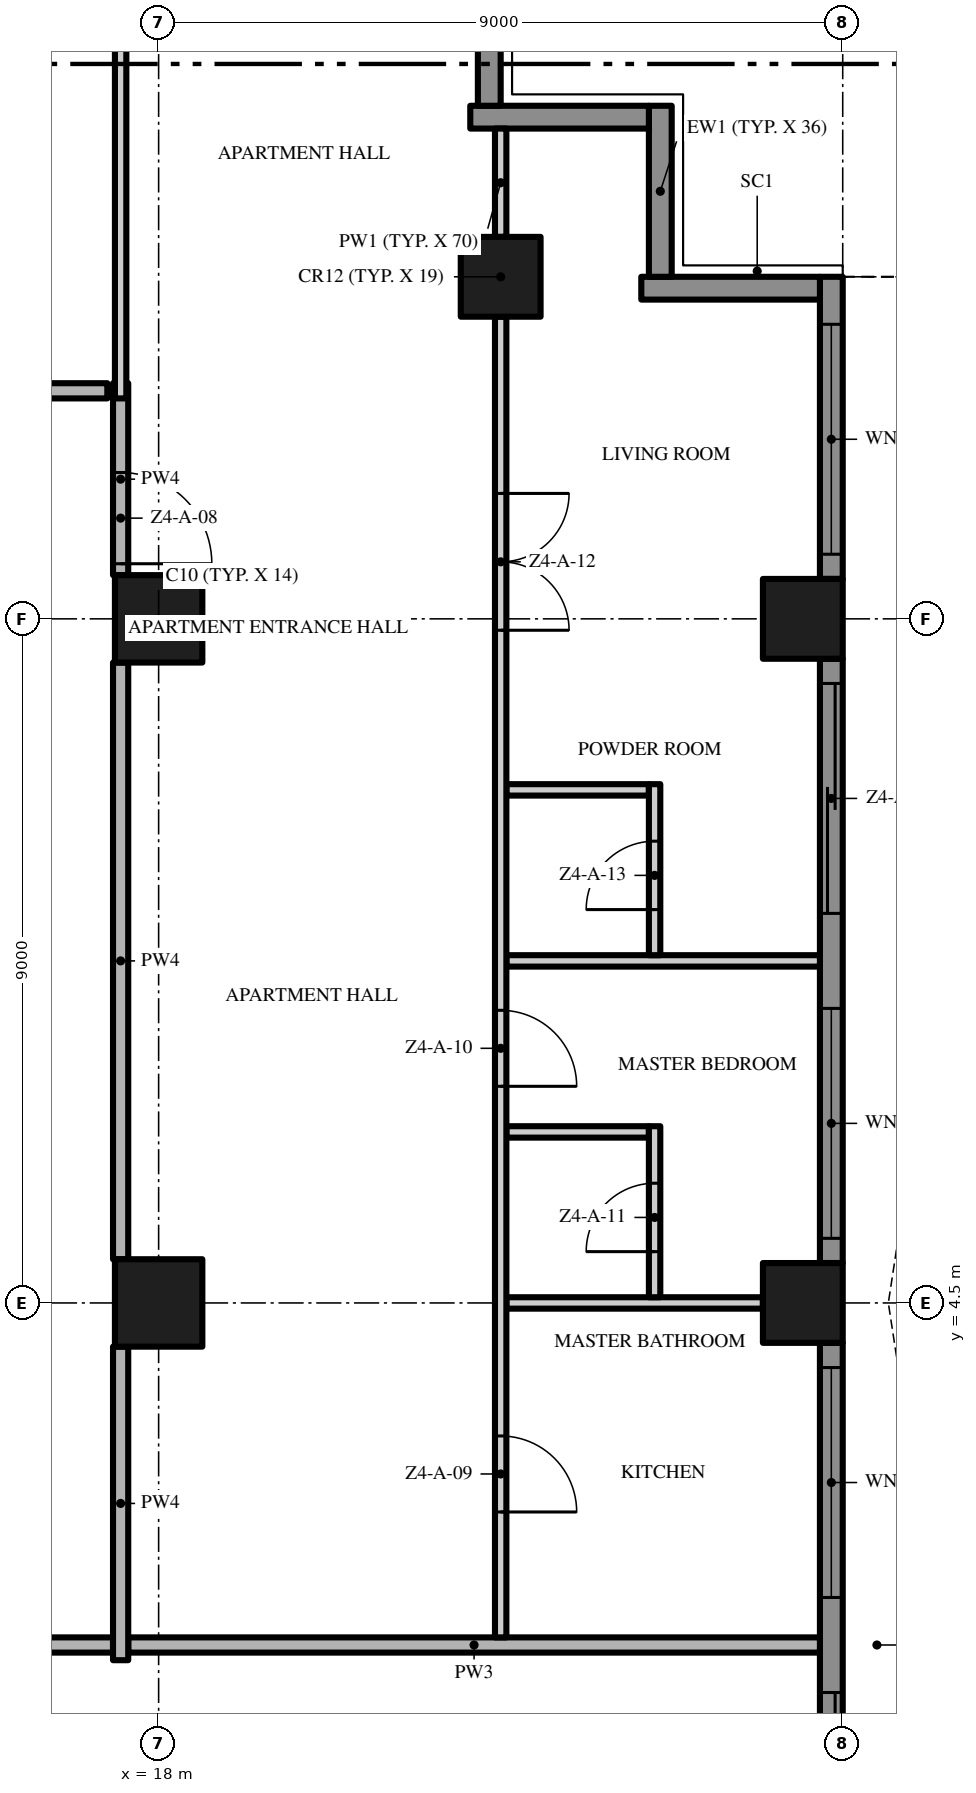
"""IFC4 building model, lengths in metres.
Left out: names, types, materials, properties, quantities, classifications, styles, units other than length and angle.
Written with IfcOpenShell. Run it as: python <this file> out.ifc"""

import sys

from ifc_helpers import new_model, si_unit, direction, frame, frame_2d, origin, origin_2d, place, context, subcontext, project, spatial, polyline, rectangle, outline, extrude, element, fill, save


model = new_model("IFC4")
c1 = context("Model", 3, precision=1e-05, world=origin(), true_north=direction((0.0, 1.0)))
c2 = subcontext(c1, "Body", "Model", "MODEL_VIEW")
j1 = project(units=[si_unit("LENGTHUNIT", "METRE"), si_unit("PLANEANGLEUNIT", "RADIAN")], contexts=[c1])
p1 = place(None, origin())
s1 = spatial("IfcSite", under=j1, at=p1, CompositionType="ELEMENT")
p2 = place(p1, origin())
s2 = spatial("IfcBuilding", under=s1, at=p2, CompositionType="ELEMENT")
p3 = place(p2, frame((0.0, 0.0, 188.2)))
s3 = spatial("IfcBuildingStorey", under=s2, at=p3, CompositionType="ELEMENT", Elevation=188.2)
for number, where, z_axis, x_axis in (
    (1, (18.0, 13.5, 0.0), (0.0, 0.0, 1.0), (1.0, 0.0, 0.0)),
    (2, (18.0, 4.5, 0.0), (0.0, 0.0, 1.0), (1.0, 0.0, 0.0)),
):
    element("IfcColumn", number, at=place(p3, frame(where, z_axis=z_axis, x_axis=x_axis)), inside=s3, PredefinedType="COLUMN", context=c2, shape_type="SweptSolid", body=[
        extrude(rectangle(XDim=1.15, YDim=1.15, at=origin_2d()), origin(), (0.0, 0.0, 1.0), 3.5),
    ])
for number, where, z_axis, x_axis in (
    (3, (26.475, 13.5, 0.0), (0.0, 0.0, 1.0), (1.0, 0.0, 0.0)),
    (4, (22.5, 18.0, 0.0), (0.0, 0.0, 1.0), (1.0, 0.0, 0.0)),
    (5, (26.475, 4.5, 0.0), (0.0, 0.0, 1.0), (1.0, 0.0, 0.0)),
):
    element("IfcColumn", number, at=place(p3, frame(where, z_axis=z_axis, x_axis=x_axis)), inside=s3, PredefinedType="COLUMN", context=c2, shape_type="SweptSolid", body=[
        extrude(rectangle(XDim=1.05, YDim=1.05, at=origin_2d()), origin(), (0.0, 0.0, 1.0), 3.5),
    ])
p4 = place(p3, frame((26.85, 3.975, 0.0), z_axis=(0.0, 0.0, 1.0), x_axis=(0.0, -1.0, 0.0)))
e6 = element("IfcWall", 6, at=p4, inside=s3, PredefinedType="SOLIDWALL", context=c2, shape_type="SweptSolid", body=[
    extrude(rectangle(XDim=7.95, YDim=0.3, at=frame_2d((3.975, 0.0))), origin(), (0.0, 0.0, 1.0), 3.5),
])
p5 = place(p4, frame((4.6, 0.0, 0.0)))
e7 = element("IfcOpeningElement", 7, at=p5, cuts=e6, PredefinedType="OPENING", context=c2, shape_type="SweptSolid", body=[
    extrude(rectangle(XDim=3.025, YDim=2.4, at=frame_2d((1.512, 1.2))), frame((0.0, 0.16, 0.0), z_axis=(0.0, -1.0, 0.0), x_axis=(1.0, 0.0, 0.0)), (0.0, 0.0, 1.0), 0.32),
])
p6 = place(p4, frame((0.325, 0.0, 0.45)))
e8 = element("IfcOpeningElement", 8, at=p6, cuts=e6, PredefinedType="OPENING", context=c2, shape_type="SweptSolid", body=[
    extrude(rectangle(XDim=3.025, YDim=2.65, at=frame_2d((1.512, 1.325))), frame((0.0, 0.16, 0.0), z_axis=(0.0, -1.0, 0.0), x_axis=(1.0, 0.0, 0.0)), (0.0, 0.0, 1.0), 0.32),
])
p7 = place(p3, frame((26.85, 12.975, 0.0), z_axis=(0.0, 0.0, 1.0), x_axis=(0.0, -1.0, 0.0)))
e9 = element("IfcWall", 9, at=p7, inside=s3, PredefinedType="SOLIDWALL", context=c2, shape_type="SweptSolid", body=[
    extrude(rectangle(XDim=7.95, YDim=0.3, at=frame_2d((3.975, 0.0))), origin(), (0.0, 0.0, 1.0), 3.5),
])
p8 = place(p7, frame((4.6, 0.0, 0.45)))
e10 = element("IfcOpeningElement", 10, at=p8, cuts=e9, PredefinedType="OPENING", context=c2, shape_type="SweptSolid", body=[
    extrude(rectangle(XDim=3.025, YDim=2.65, at=frame_2d((1.512, 1.325))), frame((0.0, 0.16, 0.0), z_axis=(0.0, -1.0, 0.0), x_axis=(1.0, 0.0, 0.0)), (0.0, 0.0, 1.0), 0.32),
])
p9 = place(p7, frame((0.325, 0.0, 0.0)))
e11 = element("IfcOpeningElement", 11, at=p9, cuts=e9, PredefinedType="OPENING", context=c2, shape_type="SweptSolid", body=[
    extrude(rectangle(XDim=3.025, YDim=2.4, at=frame_2d((1.512, 1.2))), frame((0.0, 0.16, 0.0), z_axis=(0.0, -1.0, 0.0), x_axis=(1.0, 0.0, 0.0)), (0.0, 0.0, 1.0), 0.32),
])
p10 = place(p3, frame((26.85, 18.0, 0.0), z_axis=(0.0, 0.0, 1.0), x_axis=(0.0, -1.0, 0.0)))
e12 = element("IfcWall", 12, at=p10, inside=s3, PredefinedType="SOLIDWALL", context=c2, shape_type="SweptSolid", body=[
    extrude(rectangle(XDim=3.975, YDim=0.3, at=frame_2d((1.988, 0.0))), origin(), (0.0, 0.0, 1.0), 3.5),
])
p11 = place(p10, frame((0.625, 0.0, 0.45)))
e13 = element("IfcOpeningElement", 13, at=p11, cuts=e12, PredefinedType="OPENING", context=c2, shape_type="SweptSolid", body=[
    extrude(rectangle(XDim=3.025, YDim=2.65, at=frame_2d((1.512, 1.325))), frame((0.0, 0.16, 0.0), z_axis=(0.0, -1.0, 0.0), x_axis=(1.0, 0.0, 0.0)), (0.0, 0.0, 1.0), 0.32),
])
p12 = place(p3, frame((24.35, 17.85, 0.0), z_axis=(0.0, 0.0, 1.0), x_axis=(1.0, 0.0, 0.0)))
e14 = element("IfcWall", 14, at=p12, inside=s3, PredefinedType="SOLIDWALL", context=c2, shape_type="SweptSolid", body=[
    extrude(rectangle(XDim=2.35, YDim=0.3, at=frame_2d((1.175, 0.0))), origin(), (0.0, 0.0, 1.0), 3.5),
])
p13 = place(p3, frame((24.6, 20.25, 0.0), z_axis=(0.0, 0.0, 1.0), x_axis=(0.0, -1.0, 0.0)))
e15 = element("IfcWall", 15, at=p13, inside=s3, PredefinedType="SOLIDWALL", context=c2, shape_type="SweptSolid", body=[
    extrude(rectangle(XDim=2.25, YDim=0.3, at=frame_2d((1.125, 0.0))), origin(), (0.0, 0.0, 1.0), 3.5),
])
p14 = place(p3, frame((22.1, 20.1, 0.0), z_axis=(0.0, 0.0, 1.0), x_axis=(1.0, 0.0, 0.0)))
e16 = element("IfcWall", 16, at=p14, inside=s3, PredefinedType="SOLIDWALL", context=c2, shape_type="SweptSolid", body=[
    extrude(rectangle(XDim=2.35, YDim=0.3, at=frame_2d((1.175, 0.0))), origin(), (0.0, 0.0, 1.0), 3.5),
])
p15 = place(p3, frame((22.35, 22.5, 0.0), z_axis=(0.0, 0.0, 1.0), x_axis=(0.0, -1.0, 0.0)))
e17 = element("IfcWall", 17, at=p15, inside=s3, PredefinedType="SOLIDWALL", context=c2, shape_type="SweptSolid", body=[
    extrude(rectangle(XDim=2.25, YDim=0.3, at=frame_2d((1.125, 0.0))), origin(), (0.0, 0.0, 1.0), 3.5),
])
p16 = place(p3, origin())
e18 = element("IfcWall", 18, at=p16, inside=s3, PredefinedType="USERDEFINED", context=c2, shape_type="SweptSolid", body=[
    extrude(outline(polyline([(30.0, -18.0), (29.771, -16.5), (29.171, -15.0), (28.429, -13.5), (27.829, -12.0), (27.6, -10.5), (27.829, -9.0), (28.429, -7.5), (29.171, -6.0), (29.771, -4.5), (30.0, -3.0), (29.771, -1.5), (29.171, 0.0), (28.429, 1.5), (27.829, 3.0), (27.6, 4.5), (27.829, 6.0), (28.429, 7.5), (29.171, 9.0), (29.771, 10.5), (30.0, 12.0), (29.771, 13.5), (29.171, 15.0), (28.429, 16.5), (27.829, 18.0), (27.597, 17.907), (28.201, 16.398), (28.942, 14.898), (29.528, 13.434), (29.747, 12.0), (29.528, 10.566), (28.942, 9.102), (28.201, 7.602), (27.586, 6.066), (27.347, 4.5), (27.586, 2.934), (28.201, 1.398), (28.942, -0.102), (29.528, -1.566), (29.747, -3.0), (29.528, -4.434), (28.942, -5.898), (28.201, -7.398), (27.586, -8.934), (27.347, -10.5), (27.586, -12.066), (28.201, -13.602), (28.942, -15.102), (29.528, -16.566), (29.753, -18.038), (30.0, -18.0)])), origin(), (0.0, 0.0, 1.0), 0.9),
])
p17 = place(p3, frame((17.4, 0.0, 0.0), z_axis=(0.0, 0.0, 1.0), x_axis=(-1.0, 0.0, 0.0)))
e19 = element("IfcWall", 19, at=p17, inside=s3, PredefinedType="PARTITIONING", context=c2, shape_type="SweptSolid", body=[
    extrude(rectangle(XDim=17.3, YDim=0.2, at=frame_2d((8.65, 0.0))), origin(), (0.0, 0.0, 1.0), 3.5),
])
p18 = place(p17, frame((7.65, 0.0, 0.0)))
e20 = element("IfcOpeningElement", 20, at=p18, cuts=e19, PredefinedType="OPENING", context=c2, shape_type="SweptSolid", body=[
    extrude(rectangle(XDim=1.5, YDim=2.4, at=frame_2d((0.75, 1.2))), frame((0.0, 0.11, 0.0), z_axis=(0.0, -1.0, 0.0), x_axis=(1.0, 0.0, 0.0)), (0.0, 0.0, 1.0), 0.22),
])
p19 = place(p3, frame((17.6, 0.0, 0.0), z_axis=(0.0, 0.0, 1.0), x_axis=(1.0, 0.0, 0.0)))
e21 = element("IfcWall", 21, at=p19, inside=s3, PredefinedType="PARTITIONING", context=c2, shape_type="SweptSolid", body=[
    extrude(rectangle(XDim=9.1, YDim=0.2, at=frame_2d((4.55, 0.0))), origin(), (0.0, 0.0, 1.0), 3.5),
])
p20 = place(p3, frame((22.575, 4.5, 0.0), z_axis=(0.0, 0.0, 1.0), x_axis=(1.0, 0.0, 0.0)))
e22 = element("IfcWall", 22, at=p20, inside=s3, PredefinedType="PARTITIONING", context=c2, shape_type="SweptSolid", body=[
    extrude(rectangle(XDim=3.375, YDim=0.15, at=frame_2d((1.688, 0.0))), origin(), (0.0, 0.0, 1.0), 3.5),
])
p21 = place(p3, frame((22.575, 6.75, 0.0), z_axis=(0.0, 0.0, 1.0), x_axis=(1.0, 0.0, 0.0)))
e23 = element("IfcWall", 23, at=p21, inside=s3, PredefinedType="PARTITIONING", context=c2, shape_type="SweptSolid", body=[
    extrude(rectangle(XDim=1.875, YDim=0.15, at=frame_2d((0.938, 0.0))), origin(), (0.0, 0.0, 1.0), 3.5),
])
p22 = place(p3, frame((22.575, 9.0, 0.0), z_axis=(0.0, 0.0, 1.0), x_axis=(1.0, 0.0, 0.0)))
e24 = element("IfcWall", 24, at=p22, inside=s3, PredefinedType="PARTITIONING", context=c2, shape_type="SweptSolid", body=[
    extrude(rectangle(XDim=4.125, YDim=0.15, at=frame_2d((2.062, 0.0))), origin(), (0.0, 0.0, 1.0), 3.5),
])
p23 = place(p3, frame((22.575, 11.25, 0.0), z_axis=(0.0, 0.0, 1.0), x_axis=(1.0, 0.0, 0.0)))
e25 = element("IfcWall", 25, at=p23, inside=s3, PredefinedType="PARTITIONING", context=c2, shape_type="SweptSolid", body=[
    extrude(rectangle(XDim=1.875, YDim=0.15, at=frame_2d((0.938, 0.0))), origin(), (0.0, 0.0, 1.0), 3.5),
])
p24 = place(p3, frame((13.5, 16.5, 0.0), z_axis=(0.0, 0.0, 1.0), x_axis=(1.0, 0.0, 0.0)))
e26 = element("IfcWall", 26, at=p24, inside=s3, PredefinedType="PARTITIONING", context=c2, shape_type="SweptSolid", body=[
    extrude(rectangle(XDim=3.825, YDim=0.2, at=frame_2d((1.913, 0.0))), origin(), (0.0, 0.0, 1.0), 3.5),
])
p25 = place(p24, frame((1.55, 0.0, 0.0)))
e27 = element("IfcOpeningElement", 27, at=p25, cuts=e26, PredefinedType="OPENING", context=c2, shape_type="SweptSolid", body=[
    extrude(rectangle(XDim=0.9, YDim=2.1, at=frame_2d((0.45, 1.05))), frame((0.0, 0.11, 0.0), z_axis=(0.0, -1.0, 0.0), x_axis=(1.0, 0.0, 0.0)), (0.0, 0.0, 1.0), 0.22),
])
p26 = place(p3, frame((17.5, -0.2, 0.0), z_axis=(0.0, 0.0, 1.0), x_axis=(0.0, 1.0, 0.0)))
e28 = element("IfcWall", 28, at=p26, inside=s3, PredefinedType="PARTITIONING", context=c2, shape_type="SweptSolid", body=[
    extrude(rectangle(XDim=4.125, YDim=0.2, at=frame_2d((2.062, 0.0))), origin(), (0.0, 0.0, 1.0), 3.5),
])
p27 = place(p3, frame((17.5, 5.075, 0.0), z_axis=(0.0, 0.0, 1.0), x_axis=(0.0, 1.0, 0.0)))
e29 = element("IfcWall", 29, at=p27, inside=s3, PredefinedType="PARTITIONING", context=c2, shape_type="SweptSolid", body=[
    extrude(rectangle(XDim=7.85, YDim=0.2, at=frame_2d((3.925, 0.0))), origin(), (0.0, 0.0, 1.0), 3.5),
])
p28 = place(p3, frame((17.5, 16.6, 0.0), z_axis=(0.0, 0.0, 1.0), x_axis=(0.0, -1.0, 0.0)))
e30 = element("IfcWall", 30, at=p28, inside=s3, PredefinedType="PARTITIONING", context=c2, shape_type="SweptSolid", body=[
    extrude(rectangle(XDim=2.525, YDim=0.2, at=frame_2d((1.262, 0.0))), origin(), (0.0, 0.0, 1.0), 3.5),
])
p29 = place(p28, frame((1.175, 0.0, 0.0)))
e31 = element("IfcOpeningElement", 31, at=p29, cuts=e30, PredefinedType="OPENING", context=c2, shape_type="SweptSolid", body=[
    extrude(rectangle(XDim=1.2, YDim=2.4, at=frame_2d((0.6, 1.2))), frame((0.0, 0.11, 0.0), z_axis=(0.0, -1.0, 0.0), x_axis=(1.0, 0.0, 0.0)), (0.0, 0.0, 1.0), 0.22),
])
p30 = place(p3, frame((17.5, 16.4, 0.0), z_axis=(0.0, 0.0, 1.0), x_axis=(0.0, 1.0, 0.0)))
e32 = element("IfcWall", 32, at=p30, inside=s3, PredefinedType="PARTITIONING", context=c2, shape_type="SweptSolid", body=[
    extrude(rectangle(XDim=5.05, YDim=0.15, at=frame_2d((2.525, 0.0))), origin(), (0.0, 0.0, 1.0), 3.5),
])
p31 = place(p3, frame((22.5, 17.475, 0.0), z_axis=(0.0, 0.0, 1.0), x_axis=(0.0, -1.0, 0.0)))
e33 = element("IfcWall", 33, at=p31, inside=s3, PredefinedType="PARTITIONING", context=c2, shape_type="SweptSolid", body=[
    extrude(rectangle(XDim=17.375, YDim=0.15, at=frame_2d((8.688, 0.0))), origin(), (0.0, 0.0, 1.0), 3.5),
])
p32 = place(p31, frame((14.725, 0.0, 0.0)))
e34 = element("IfcOpeningElement", 34, at=p32, cuts=e33, PredefinedType="OPENING", context=c2, shape_type="SweptSolid", body=[
    extrude(rectangle(XDim=1.0, YDim=2.4, at=frame_2d((0.5, 1.2))), frame((0.0, 0.085, 0.0), z_axis=(0.0, -1.0, 0.0), x_axis=(1.0, 0.0, 0.0)), (0.0, 0.0, 1.0), 0.17),
])
p33 = place(p31, frame((9.125, 0.0, 0.0)))
e35 = element("IfcOpeningElement", 35, at=p33, cuts=e33, PredefinedType="OPENING", context=c2, shape_type="SweptSolid", body=[
    extrude(rectangle(XDim=1.0, YDim=2.4, at=frame_2d((0.5, 1.2))), frame((0.0, 0.085, 0.0), z_axis=(0.0, -1.0, 0.0), x_axis=(1.0, 0.0, 0.0)), (0.0, 0.0, 1.0), 0.17),
])
p34 = place(p31, frame((2.325, 0.0, 0.0)))
e36 = element("IfcOpeningElement", 36, at=p34, cuts=e33, PredefinedType="OPENING", context=c2, shape_type="SweptSolid", body=[
    extrude(rectangle(XDim=1.8, YDim=2.4, at=frame_2d((0.9, 1.2))), frame((0.0, 0.085, 0.0), z_axis=(0.0, -1.0, 0.0), x_axis=(1.0, 0.0, 0.0)), (0.0, 0.0, 1.0), 0.17),
])
p35 = place(p3, frame((22.5, 18.525, 0.0), z_axis=(0.0, 0.0, 1.0), x_axis=(0.0, 1.0, 0.0)))
e37 = element("IfcWall", 37, at=p35, inside=s3, PredefinedType="PARTITIONING", context=c2, shape_type="SweptSolid", body=[
    extrude(rectangle(XDim=1.425, YDim=0.15, at=frame_2d((0.713, 0.0))), origin(), (0.0, 0.0, 1.0), 3.5),
])
p36 = place(p3, frame((24.525, 4.575, 0.0), z_axis=(0.0, 0.0, 1.0), x_axis=(0.0, 1.0, 0.0)))
e38 = element("IfcWall", 38, at=p36, inside=s3, PredefinedType="PARTITIONING", context=c2, shape_type="SweptSolid", body=[
    extrude(rectangle(XDim=2.25, YDim=0.15, at=frame_2d((1.125, 0.0))), origin(), (0.0, 0.0, 1.0), 3.5),
])
p37 = place(p36, frame((0.6, 0.0, 0.0)))
e39 = element("IfcOpeningElement", 39, at=p37, cuts=e38, PredefinedType="OPENING", context=c2, shape_type="SweptSolid", body=[
    extrude(rectangle(XDim=0.9, YDim=2.1, at=frame_2d((0.45, 1.05))), frame((0.0, 0.085, 0.0), z_axis=(0.0, -1.0, 0.0), x_axis=(1.0, 0.0, 0.0)), (0.0, 0.0, 1.0), 0.17),
])
p38 = place(p3, frame((24.525, 9.075, 0.0), z_axis=(0.0, 0.0, 1.0), x_axis=(0.0, 1.0, 0.0)))
e40 = element("IfcWall", 40, at=p38, inside=s3, PredefinedType="PARTITIONING", context=c2, shape_type="SweptSolid", body=[
    extrude(rectangle(XDim=2.25, YDim=0.15, at=frame_2d((1.125, 0.0))), origin(), (0.0, 0.0, 1.0), 3.5),
])
p39 = place(p38, frame((0.6, 0.0, 0.0)))
e41 = element("IfcOpeningElement", 41, at=p39, cuts=e40, PredefinedType="OPENING", context=c2, shape_type="SweptSolid", body=[
    extrude(rectangle(XDim=0.9, YDim=2.1, at=frame_2d((0.45, 1.05))), frame((0.0, 0.085, 0.0), z_axis=(0.0, -1.0, 0.0), x_axis=(1.0, 0.0, 0.0)), (0.0, 0.0, 1.0), 0.17),
])
p40 = place(p5, origin())
e42 = element("IfcDoor", 42, at=p40, inside=s3, OperationType="SINGLE_SWING_LEFT", PredefinedType="DOOR", context=c2, shape_type="SweptSolid", body=[
    extrude(rectangle(XDim=3.025, YDim=2.4, at=frame_2d((1.512, 1.2))), frame((0.0, 0.025, 0.0), z_axis=(0.0, -1.0, 0.0), x_axis=(1.0, 0.0, 0.0)), (0.0, 0.0, 1.0), 0.05),
])
fill(e7, e42)
p41 = place(p6, origin())
e43 = element("IfcWindow", 43, at=p41, inside=s3, PartitioningType="SINGLE_PANEL", PredefinedType="WINDOW", context=c2, shape_type="SweptSolid", body=[
    extrude(rectangle(XDim=3.025, YDim=2.65, at=frame_2d((1.512, 1.325))), frame((0.0, 0.03, 0.0), z_axis=(0.0, -1.0, 0.0), x_axis=(1.0, 0.0, 0.0)), (0.0, 0.0, 1.0), 0.06),
])
fill(e8, e43)
p42 = place(p8, origin())
e44 = element("IfcWindow", 44, at=p42, inside=s3, PartitioningType="SINGLE_PANEL", PredefinedType="WINDOW", context=c2, shape_type="SweptSolid", body=[
    extrude(rectangle(XDim=3.025, YDim=2.65, at=frame_2d((1.512, 1.325))), frame((0.0, 0.03, 0.0), z_axis=(0.0, -1.0, 0.0), x_axis=(1.0, 0.0, 0.0)), (0.0, 0.0, 1.0), 0.06),
])
fill(e10, e44)
p43 = place(p9, origin())
e45 = element("IfcDoor", 45, at=p43, inside=s3, OperationType="SINGLE_SWING_LEFT", PredefinedType="DOOR", context=c2, shape_type="SweptSolid", body=[
    extrude(rectangle(XDim=3.025, YDim=2.4, at=frame_2d((1.512, 1.2))), frame((0.0, 0.025, 0.0), z_axis=(0.0, -1.0, 0.0), x_axis=(1.0, 0.0, 0.0)), (0.0, 0.0, 1.0), 0.05),
])
fill(e11, e45)
p44 = place(p11, origin())
e46 = element("IfcWindow", 46, at=p44, inside=s3, PartitioningType="SINGLE_PANEL", PredefinedType="WINDOW", context=c2, shape_type="SweptSolid", body=[
    extrude(rectangle(XDim=3.025, YDim=2.65, at=frame_2d((1.512, 1.325))), frame((0.0, 0.03, 0.0), z_axis=(0.0, -1.0, 0.0), x_axis=(1.0, 0.0, 0.0)), (0.0, 0.0, 1.0), 0.06),
])
fill(e13, e46)
p45 = place(p29, origin())
e47 = element("IfcDoor", 47, at=p45, inside=s3, OperationType="SINGLE_SWING_RIGHT", PredefinedType="DOOR", context=c2, shape_type="SweptSolid", body=[
    extrude(rectangle(XDim=1.2, YDim=2.4, at=frame_2d((0.6, 1.2))), frame((0.0, 0.025, 0.0), z_axis=(0.0, -1.0, 0.0), x_axis=(1.0, 0.0, 0.0)), (0.0, 0.0, 1.0), 0.05),
])
fill(e31, e47)
p46 = place(p32, origin())
e48 = element("IfcDoor", 48, at=p46, inside=s3, OperationType="SINGLE_SWING_RIGHT", PredefinedType="DOOR", context=c2, shape_type="SweptSolid", body=[
    extrude(rectangle(XDim=1.0, YDim=2.4, at=frame_2d((0.5, 1.2))), frame((0.0, 0.025, 0.0), z_axis=(0.0, -1.0, 0.0), x_axis=(1.0, 0.0, 0.0)), (0.0, 0.0, 1.0), 0.05),
])
fill(e34, e48)
p47 = place(p33, origin())
e49 = element("IfcDoor", 49, at=p47, inside=s3, OperationType="SINGLE_SWING_RIGHT", PredefinedType="DOOR", context=c2, shape_type="SweptSolid", body=[
    extrude(rectangle(XDim=1.0, YDim=2.4, at=frame_2d((0.5, 1.2))), frame((0.0, 0.025, 0.0), z_axis=(0.0, -1.0, 0.0), x_axis=(1.0, 0.0, 0.0)), (0.0, 0.0, 1.0), 0.05),
])
fill(e35, e49)
p48 = place(p37, origin())
e50 = element("IfcDoor", 50, at=p48, inside=s3, OperationType="SINGLE_SWING_LEFT", PredefinedType="DOOR", context=c2, shape_type="SweptSolid", body=[
    extrude(rectangle(XDim=0.9, YDim=2.1, at=frame_2d((0.45, 1.05))), frame((0.0, 0.025, 0.0), z_axis=(0.0, -1.0, 0.0), x_axis=(1.0, 0.0, 0.0)), (0.0, 0.0, 1.0), 0.05),
])
fill(e39, e50)
p49 = place(p34, origin())
e51 = element("IfcDoor", 51, at=p49, inside=s3, OperationType="DOUBLE_DOOR_SINGLE_SWING", PredefinedType="DOOR", context=c2, shape_type="SweptSolid", body=[
    extrude(rectangle(XDim=1.8, YDim=2.4, at=frame_2d((0.9, 1.2))), frame((0.0, 0.025, 0.0), z_axis=(0.0, -1.0, 0.0), x_axis=(1.0, 0.0, 0.0)), (0.0, 0.0, 1.0), 0.05),
])
fill(e36, e51)
p50 = place(p39, origin())
e52 = element("IfcDoor", 52, at=p50, inside=s3, OperationType="SINGLE_SWING_LEFT", PredefinedType="DOOR", context=c2, shape_type="SweptSolid", body=[
    extrude(rectangle(XDim=0.9, YDim=2.1, at=frame_2d((0.45, 1.05))), frame((0.0, 0.025, 0.0), z_axis=(0.0, -1.0, 0.0), x_axis=(1.0, 0.0, 0.0)), (0.0, 0.0, 1.0), 0.05),
])
fill(e41, e52)
save(model, sys.argv[1])
